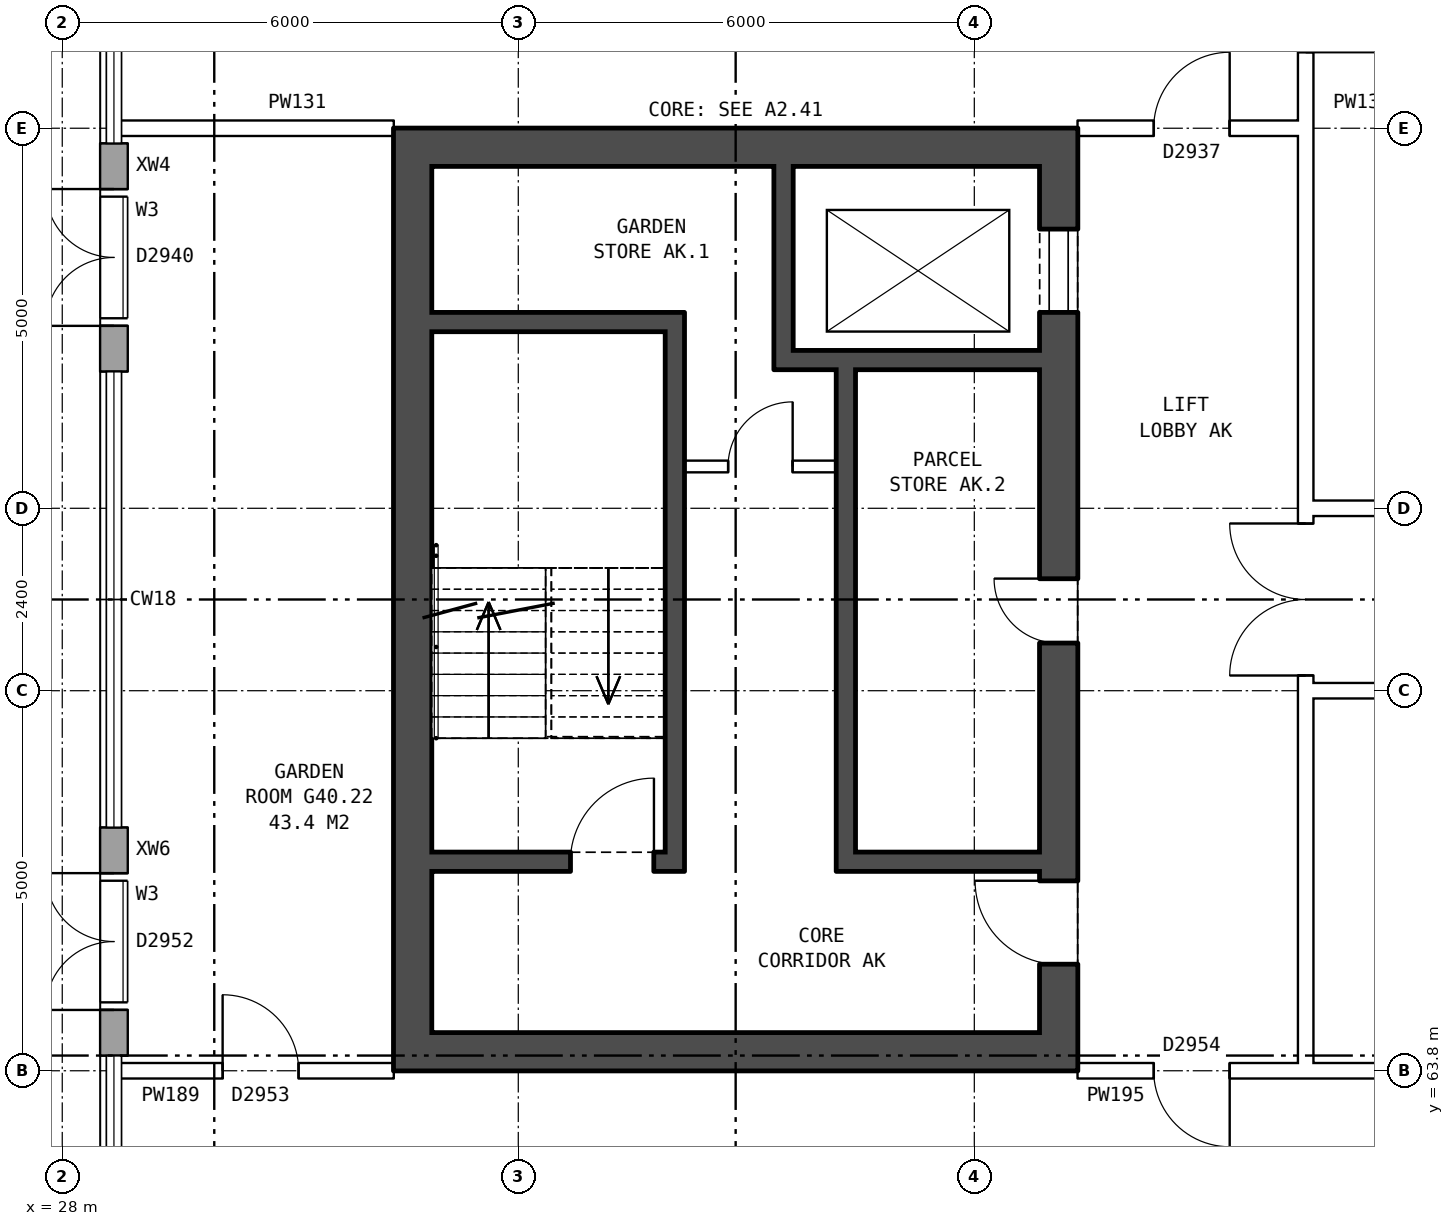
"""IFC4 building model, lengths in metres.
Left out: names, types, materials, properties, quantities, classifications, styles, units other than length and angle.
Written with IfcOpenShell. Run it as: python <this file> out.ifc"""

import sys

from ifc_helpers import new_model, si_unit, direction, frame, frame_2d, origin, place, context, subcontext, project, spatial, rectangle, extrude, element, fill, save


model = new_model("IFC4")
c1 = context("Model", 3, precision=1e-05, world=origin(), true_north=direction((0.0, 1.0)))
c2 = subcontext(c1, "Body", "Model", "MODEL_VIEW")
j1 = project(units=[si_unit("LENGTHUNIT", "METRE"), si_unit("PLANEANGLEUNIT", "RADIAN")], contexts=[c1])
p1 = place(None, origin())
s1 = spatial("IfcSite", under=j1, at=p1, CompositionType="ELEMENT")
p2 = place(p1, origin())
s2 = spatial("IfcBuilding", under=s1, at=p2, CompositionType="ELEMENT")
p3 = place(p2, frame((0.0, 0.0, 142.3)))
s3 = spatial("IfcBuildingStorey", under=s2, at=p3, CompositionType="ELEMENT", Elevation=142.3)
p4 = place(p3, frame((28.68, 76.0, 0.0), z_axis=(0.0, 0.0, 1.0), x_axis=(0.0, -1.0, 0.0)))
e1 = element("IfcWall", 1, at=p4, inside=s3, PredefinedType="STANDARD", context=c2, shape_type="SweptSolid", body=[
    extrude(rectangle(XDim=3.0, YDim=0.36, at=frame_2d((1.5, 0.0))), origin(), (0.0, 0.0, 1.0), 5.6),
])
p5 = place(p4, frame((0.7, 0.0, 3.4)))
e2 = element("IfcOpeningElement", 2, at=p5, cuts=e1, PredefinedType="OPENING", context=c2, shape_type="SweptSolid", body=[
    extrude(rectangle(XDim=1.6, YDim=1.2, at=frame_2d((0.8, 0.6))), frame((0.0, 0.19, 0.0), z_axis=(0.0, -1.0, 0.0), x_axis=(1.0, 0.0, 0.0)), (0.0, 0.0, 1.0), 0.38),
])
p6 = place(p4, frame((0.6, 0.0, 0.0)))
e3 = element("IfcOpeningElement", 3, at=p6, cuts=e1, PredefinedType="OPENING", context=c2, shape_type="SweptSolid", body=[
    extrude(rectangle(XDim=1.8, YDim=2.4, at=frame_2d((0.9, 1.2))), frame((0.0, 0.19, 0.0), z_axis=(0.0, -1.0, 0.0), x_axis=(1.0, 0.0, 0.0)), (0.0, 0.0, 1.0), 0.38),
])
p7 = place(p3, frame((28.68, 67.0, 0.0), z_axis=(0.0, 0.0, 1.0), x_axis=(0.0, -1.0, 0.0)))
e4 = element("IfcWall", 4, at=p7, inside=s3, PredefinedType="STANDARD", context=c2, shape_type="SweptSolid", body=[
    extrude(rectangle(XDim=3.0, YDim=0.36, at=frame_2d((1.5, 0.0))), origin(), (0.0, 0.0, 1.0), 5.6),
])
p8 = place(p7, frame((0.7, 0.0, 3.4)))
e5 = element("IfcOpeningElement", 5, at=p8, cuts=e4, PredefinedType="OPENING", context=c2, shape_type="SweptSolid", body=[
    extrude(rectangle(XDim=1.6, YDim=1.2, at=frame_2d((0.8, 0.6))), frame((0.0, 0.19, 0.0), z_axis=(0.0, -1.0, 0.0), x_axis=(1.0, 0.0, 0.0)), (0.0, 0.0, 1.0), 0.38),
])
p9 = place(p7, frame((0.6, 0.0, 0.0)))
e6 = element("IfcOpeningElement", 6, at=p9, cuts=e4, PredefinedType="OPENING", context=c2, shape_type="SweptSolid", body=[
    extrude(rectangle(XDim=1.8, YDim=2.4, at=frame_2d((0.9, 1.2))), frame((0.0, 0.19, 0.0), z_axis=(0.0, -1.0, 0.0), x_axis=(1.0, 0.0, 0.0)), (0.0, 0.0, 1.0), 0.38),
])
p10 = place(p3, frame((41.11, 76.2, 0.0), z_axis=(0.0, 0.0, 1.0), x_axis=(0.0, -1.0, 0.0)))
e7 = element("IfcWall", 7, at=p10, inside=s3, PredefinedType="SHEAR", context=c2, shape_type="SweptSolid", body=[
    extrude(rectangle(XDim=12.4, YDim=0.5, at=frame_2d((6.2, 0.0))), origin(), (0.0, 0.0, 1.0), 5.6),
])
p11 = place(p10, frame((1.325, 0.0, 0.0)))
e8 = element("IfcOpeningElement", 8, at=p11, cuts=e7, PredefinedType="OPENING", context=c2, shape_type="SweptSolid", body=[
    extrude(rectangle(XDim=1.1, YDim=2.1, at=frame_2d((0.55, 1.05))), frame((0.0, 0.26, 0.0), z_axis=(0.0, -1.0, 0.0), x_axis=(1.0, 0.0, 0.0)), (0.0, 0.0, 1.0), 0.52),
])
p12 = place(p10, frame((5.925, 0.0, 0.0)))
e9 = element("IfcOpeningElement", 9, at=p12, cuts=e7, PredefinedType="OPENING", context=c2, shape_type="SweptSolid", body=[
    extrude(rectangle(XDim=0.85, YDim=2.1, at=frame_2d((0.425, 1.05))), frame((0.0, 0.26, 0.0), z_axis=(0.0, -1.0, 0.0), x_axis=(1.0, 0.0, 0.0)), (0.0, 0.0, 1.0), 0.52),
])
p13 = place(p10, frame((9.9, 0.0, 0.0)))
e10 = element("IfcOpeningElement", 10, at=p13, cuts=e7, PredefinedType="OPENING", context=c2, shape_type="SweptSolid", body=[
    extrude(rectangle(XDim=1.1, YDim=2.1, at=frame_2d((0.55, 1.05))), frame((0.0, 0.26, 0.0), z_axis=(0.0, -1.0, 0.0), x_axis=(1.0, 0.0, 0.0)), (0.0, 0.0, 1.0), 0.52),
])
p14 = place(p3, frame((32.61, 76.2, 0.0), z_axis=(0.0, 0.0, 1.0), x_axis=(0.0, -1.0, 0.0)))
e11 = element("IfcWall", 11, at=p14, inside=s3, PredefinedType="SHEAR", context=c2, shape_type="SweptSolid", body=[
    extrude(rectangle(XDim=12.4, YDim=0.5, at=frame_2d((6.2, 0.0))), origin(), (0.0, 0.0, 1.0), 5.6),
])
for number, where, z_axis, x_axis in (
    (12, (40.86, 75.95, 0.0), (0.0, 0.0, 1.0), (-1.0, 0.0, 0.0)),
    (13, (40.86, 64.05, 0.0), (0.0, 0.0, 1.0), (-1.0, 0.0, 0.0)),
):
    element("IfcWall", number, at=place(p3, frame(where, z_axis=z_axis, x_axis=x_axis)), inside=s3, PredefinedType="SHEAR", context=c2, shape_type="SweptSolid", body=[
        extrude(rectangle(XDim=8.0, YDim=0.5, at=frame_2d((4.0, 0.0))), origin(), (0.0, 0.0, 1.0), 5.6),
    ])
p15 = place(p3, frame((35.935, 73.65, 0.0), z_axis=(0.0, 0.0, 1.0), x_axis=(-1.0, 0.0, 0.0)))
e14 = element("IfcWall", 14, at=p15, inside=s3, PredefinedType="SHEAR", context=c2, shape_type="SweptSolid", body=[
    extrude(rectangle(XDim=3.075, YDim=0.25, at=frame_2d((1.538, 0.0))), origin(), (0.0, 0.0, 1.0), 5.6),
])
p16 = place(p3, frame((40.86, 73.15, 0.0), z_axis=(0.0, 0.0, 1.0), x_axis=(-1.0, 0.0, 0.0)))
e15 = element("IfcWall", 15, at=p16, inside=s3, PredefinedType="SHEAR", context=c2, shape_type="SweptSolid", body=[
    extrude(rectangle(XDim=3.495, YDim=0.25, at=frame_2d((1.748, 0.0))), origin(), (0.0, 0.0, 1.0), 5.6),
])
p17 = place(p3, frame((38.185, 71.75, 0.0), z_axis=(0.0, 0.0, 1.0), x_axis=(-1.0, 0.0, 0.0)))
e16 = element("IfcWall", 16, at=p17, inside=s3, PredefinedType="PARTITIONING", context=c2, shape_type="SweptSolid", body=[
    extrude(rectangle(XDim=2.0, YDim=0.15, at=frame_2d((1.0, 0.0))), origin(), (0.0, 0.0, 1.0), 5.6),
])
p18 = place(p17, frame((0.575, 0.0, 0.0)))
e17 = element("IfcOpeningElement", 17, at=p18, cuts=e16, PredefinedType="OPENING", context=c2, shape_type="SweptSolid", body=[
    extrude(rectangle(XDim=0.85, YDim=2.1, at=frame_2d((0.425, 1.05))), frame((0.0, 0.085, 0.0), z_axis=(0.0, -1.0, 0.0), x_axis=(1.0, 0.0, 0.0)), (0.0, 0.0, 1.0), 0.17),
])
p19 = place(p3, frame((40.86, 66.55, 0.0), z_axis=(0.0, 0.0, 1.0), x_axis=(-1.0, 0.0, 0.0)))
e18 = element("IfcWall", 18, at=p19, inside=s3, PredefinedType="SHEAR", context=c2, shape_type="SweptSolid", body=[
    extrude(rectangle(XDim=2.425, YDim=0.25, at=frame_2d((1.212, 0.0))), origin(), (0.0, 0.0, 1.0), 5.6),
])
p20 = place(p3, frame((35.935, 66.55, 0.0), z_axis=(0.0, 0.0, 1.0), x_axis=(-1.0, 0.0, 0.0)))
e19 = element("IfcWall", 19, at=p20, inside=s3, PredefinedType="SHEAR", context=c2, shape_type="SweptSolid", body=[
    extrude(rectangle(XDim=3.075, YDim=0.25, at=frame_2d((1.538, 0.0))), origin(), (0.0, 0.0, 1.0), 5.6),
])
p21 = place(p20, frame((0.15, 0.0, 0.0)))
e20 = element("IfcOpeningElement", 20, at=p21, cuts=e19, PredefinedType="OPENING", context=c2, shape_type="SweptSolid", body=[
    extrude(rectangle(XDim=1.1, YDim=2.1, at=frame_2d((0.55, 1.05))), frame((0.0, 0.135, 0.0), z_axis=(0.0, -1.0, 0.0), x_axis=(1.0, 0.0, 0.0)), (0.0, 0.0, 1.0), 0.27),
])
p22 = place(p3, frame((38.31, 73.025, 0.0), z_axis=(0.0, 0.0, 1.0), x_axis=(0.0, -1.0, 0.0)))
e21 = element("IfcWall", 21, at=p22, inside=s3, PredefinedType="SHEAR", context=c2, shape_type="SweptSolid", body=[
    extrude(rectangle(XDim=6.6, YDim=0.25, at=frame_2d((3.3, 0.0))), origin(), (0.0, 0.0, 1.0), 5.6),
])
p23 = place(p3, frame((37.49, 75.7, 0.0), z_axis=(0.0, 0.0, 1.0), x_axis=(0.0, -1.0, 0.0)))
e22 = element("IfcWall", 22, at=p23, inside=s3, PredefinedType="SHEAR", context=c2, shape_type="SweptSolid", body=[
    extrude(rectangle(XDim=2.425, YDim=0.25, at=frame_2d((1.212, 0.0))), origin(), (0.0, 0.0, 1.0), 5.6),
])
p24 = place(p3, frame((36.06, 73.775, 0.0), z_axis=(0.0, 0.0, 1.0), x_axis=(0.0, -1.0, 0.0)))
e23 = element("IfcWall", 23, at=p24, inside=s3, PredefinedType="SHEAR", context=c2, shape_type="SweptSolid", body=[
    extrude(rectangle(XDim=7.35, YDim=0.25, at=frame_2d((3.675, 0.0))), origin(), (0.0, 0.0, 1.0), 5.6),
])
p25 = place(p3, frame((44.36, 63.9, 0.0), z_axis=(0.0, 0.0, 1.0), x_axis=(0.0, 1.0, 0.0)))
e24 = element("IfcWall", 24, at=p25, inside=s3, PredefinedType="PARTITIONING", context=c2, shape_type="SweptSolid", body=[
    extrude(rectangle(XDim=12.2, YDim=0.2, at=frame_2d((6.1, 0.0))), origin(), (0.0, 0.0, 1.0), 5.6),
])
p26 = place(p25, frame((5.1, 0.0, 0.0)))
e25 = element("IfcOpeningElement", 25, at=p26, cuts=e24, PredefinedType="OPENING", context=c2, shape_type="SweptSolid", body=[
    extrude(rectangle(XDim=2.0, YDim=2.1, at=frame_2d((1.0, 1.05))), frame((0.0, 0.11, 0.0), z_axis=(0.0, -1.0, 0.0), x_axis=(1.0, 0.0, 0.0)), (0.0, 0.0, 1.0), 0.22),
])
p27 = place(p3, frame((28.74, 63.8, 0.0), z_axis=(0.0, 0.0, 1.0), x_axis=(1.0, 0.0, 0.0)))
e26 = element("IfcWall", 26, at=p27, inside=s3, PredefinedType="PARTITIONING", context=c2, shape_type="SweptSolid", body=[
    extrude(rectangle(XDim=3.62, YDim=0.2, at=frame_2d((1.81, 0.0))), origin(), (0.0, 0.0, 1.0), 5.6),
])
p28 = place(p27, frame((1.37, 0.0, 0.0)))
e27 = element("IfcOpeningElement", 27, at=p28, cuts=e26, PredefinedType="OPENING", context=c2, shape_type="SweptSolid", body=[
    extrude(rectangle(XDim=1.0, YDim=2.1, at=frame_2d((0.5, 1.05))), frame((0.0, 0.11, 0.0), z_axis=(0.0, -1.0, 0.0), x_axis=(1.0, 0.0, 0.0)), (0.0, 0.0, 1.0), 0.22),
])
p29 = place(p3, frame((44.36, 63.8, 0.0), z_axis=(0.0, 0.0, 1.0), x_axis=(1.0, 0.0, 0.0)))
e28 = element("IfcWall", 28, at=p29, inside=s3, PredefinedType="PARTITIONING", context=c2, shape_type="SweptSolid", body=[
    extrude(rectangle(XDim=3.74, YDim=0.2, at=frame_2d((1.87, 0.0))), origin(), (0.0, 0.0, 1.0), 5.6),
])
p30 = place(p3, frame((41.36, 63.8, 0.0), z_axis=(0.0, 0.0, 1.0), x_axis=(1.0, 0.0, 0.0)))
e29 = element("IfcWall", 29, at=p30, inside=s3, PredefinedType="PARTITIONING", context=c2, shape_type="SweptSolid", body=[
    extrude(rectangle(XDim=3.0, YDim=0.2, at=frame_2d((1.5, 0.0))), origin(), (0.0, 0.0, 1.0), 5.6),
])
p31 = place(p30, frame((1.0, 0.0, 0.0)))
e30 = element("IfcOpeningElement", 30, at=p31, cuts=e29, PredefinedType="OPENING", context=c2, shape_type="SweptSolid", body=[
    extrude(rectangle(XDim=1.0, YDim=2.1, at=frame_2d((0.5, 1.05))), frame((0.0, 0.11, 0.0), z_axis=(0.0, -1.0, 0.0), x_axis=(1.0, 0.0, 0.0)), (0.0, 0.0, 1.0), 0.22),
])
p32 = place(p3, frame((44.36, 68.8, 0.0), z_axis=(0.0, 0.0, 1.0), x_axis=(1.0, 0.0, 0.0)))
e31 = element("IfcWall", 31, at=p32, inside=s3, PredefinedType="PARTITIONING", context=c2, shape_type="SweptSolid", body=[
    extrude(rectangle(XDim=19.28, YDim=0.2, at=frame_2d((9.64, 0.0))), origin(), (0.0, 0.0, 1.0), 5.6),
])
p33 = place(p32, frame((6.32, 0.0, 0.0)))
e32 = element("IfcOpeningElement", 32, at=p33, cuts=e31, PredefinedType="OPENING", context=c2, shape_type="SweptSolid", body=[
    extrude(rectangle(XDim=1.0, YDim=2.1, at=frame_2d((0.5, 1.05))), frame((0.0, 0.11, 0.0), z_axis=(0.0, -1.0, 0.0), x_axis=(1.0, 0.0, 0.0)), (0.0, 0.0, 1.0), 0.22),
])
p34 = place(p3, frame((44.36, 71.2, 0.0), z_axis=(0.0, 0.0, 1.0), x_axis=(1.0, 0.0, 0.0)))
e33 = element("IfcWall", 33, at=p34, inside=s3, PredefinedType="PARTITIONING", context=c2, shape_type="SweptSolid", body=[
    extrude(rectangle(XDim=19.28, YDim=0.2, at=frame_2d((9.64, 0.0))), origin(), (0.0, 0.0, 1.0), 5.6),
])
p35 = place(p34, frame((8.64, 0.0, 0.0)))
e34 = element("IfcOpeningElement", 34, at=p35, cuts=e33, PredefinedType="OPENING", context=c2, shape_type="SweptSolid", body=[
    extrude(rectangle(XDim=1.0, YDim=2.1, at=frame_2d((0.5, 1.05))), frame((0.0, 0.11, 0.0), z_axis=(0.0, -1.0, 0.0), x_axis=(1.0, 0.0, 0.0)), (0.0, 0.0, 1.0), 0.22),
])
p36 = place(p3, frame((28.74, 76.2, 0.0), z_axis=(0.0, 0.0, 1.0), x_axis=(1.0, 0.0, 0.0)))
e35 = element("IfcWall", 35, at=p36, inside=s3, PredefinedType="PARTITIONING", context=c2, shape_type="SweptSolid", body=[
    extrude(rectangle(XDim=3.62, YDim=0.2, at=frame_2d((1.81, 0.0))), origin(), (0.0, 0.0, 1.0), 5.6),
])
p37 = place(p3, frame((41.36, 76.2, 0.0), z_axis=(0.0, 0.0, 1.0), x_axis=(1.0, 0.0, 0.0)))
e36 = element("IfcWall", 36, at=p37, inside=s3, PredefinedType="PARTITIONING", context=c2, shape_type="SweptSolid", body=[
    extrude(rectangle(XDim=3.1, YDim=0.2, at=frame_2d((1.55, 0.0))), origin(), (0.0, 0.0, 1.0), 5.6),
])
p38 = place(p37, frame((1.0, 0.0, 0.0)))
e37 = element("IfcOpeningElement", 37, at=p38, cuts=e36, PredefinedType="OPENING", context=c2, shape_type="SweptSolid", body=[
    extrude(rectangle(XDim=1.0, YDim=2.1, at=frame_2d((0.5, 1.05))), frame((0.0, 0.11, 0.0), z_axis=(0.0, -1.0, 0.0), x_axis=(1.0, 0.0, 0.0)), (0.0, 0.0, 1.0), 0.22),
])
p39 = place(p3, frame((44.36, 76.1, 0.0), z_axis=(0.0, 0.0, 1.0), x_axis=(0.0, 1.0, 0.0)))
e38 = element("IfcWall", 38, at=p39, inside=s3, PredefinedType="PARTITIONING", context=c2, shape_type="SweptSolid", body=[
    extrude(rectangle(XDim=3.2, YDim=0.2, at=frame_2d((1.6, 0.0))), origin(), (0.0, 0.0, 1.0), 5.6),
])
p40 = place(p39, frame((1.1, 0.0, 0.0)))
e39 = element("IfcOpeningElement", 39, at=p40, cuts=e38, PredefinedType="OPENING", context=c2, shape_type="SweptSolid", body=[
    extrude(rectangle(XDim=1.0, YDim=2.1, at=frame_2d((0.5, 1.05))), frame((0.0, 0.11, 0.0), z_axis=(0.0, -1.0, 0.0), x_axis=(1.0, 0.0, 0.0)), (0.0, 0.0, 1.0), 0.22),
])
p41 = place(p5, origin())
e40 = element("IfcWindow", 40, at=p41, inside=s3, PartitioningType="DOUBLE_PANEL_HORIZONTAL", PredefinedType="WINDOW", context=c2, shape_type="SweptSolid", body=[
    extrude(rectangle(XDim=1.6, YDim=1.2, at=frame_2d((0.8, 0.6))), frame((0.0, 0.15, 0.0), z_axis=(0.0, -1.0, 0.0), x_axis=(1.0, 0.0, 0.0)), (0.0, 0.0, 1.0), 0.06),
])
fill(e2, e40)
p42 = place(p6, frame((1.8, 0.0, 0.0), z_axis=(0.0, 0.0, 1.0), x_axis=(-1.0, 0.0, 0.0)))
e41 = element("IfcDoor", 41, at=p42, inside=s3, OperationType="DOUBLE_DOOR_SINGLE_SWING", PredefinedType="DOOR", context=c2, shape_type="SweptSolid", body=[
    extrude(rectangle(XDim=1.8, YDim=2.4, at=frame_2d((0.9, 1.2))), frame((0.0, 0.025, 0.0), z_axis=(0.0, -1.0, 0.0), x_axis=(1.0, 0.0, 0.0)), (0.0, 0.0, 1.0), 0.05),
])
fill(e3, e41)
p43 = place(p8, origin())
e42 = element("IfcWindow", 42, at=p43, inside=s3, PartitioningType="DOUBLE_PANEL_HORIZONTAL", PredefinedType="WINDOW", context=c2, shape_type="SweptSolid", body=[
    extrude(rectangle(XDim=1.6, YDim=1.2, at=frame_2d((0.8, 0.6))), frame((0.0, 0.15, 0.0), z_axis=(0.0, -1.0, 0.0), x_axis=(1.0, 0.0, 0.0)), (0.0, 0.0, 1.0), 0.06),
])
fill(e5, e42)
p44 = place(p9, frame((1.8, 0.0, 0.0), z_axis=(0.0, 0.0, 1.0), x_axis=(-1.0, 0.0, 0.0)))
e43 = element("IfcDoor", 43, at=p44, inside=s3, OperationType="DOUBLE_DOOR_SINGLE_SWING", PredefinedType="DOOR", context=c2, shape_type="SweptSolid", body=[
    extrude(rectangle(XDim=1.8, YDim=2.4, at=frame_2d((0.9, 1.2))), frame((0.0, 0.025, 0.0), z_axis=(0.0, -1.0, 0.0), x_axis=(1.0, 0.0, 0.0)), (0.0, 0.0, 1.0), 0.05),
])
fill(e6, e43)
p45 = place(p11, origin())
e44 = element("IfcDoor", 44, at=p45, inside=s3, OperationType="DOUBLE_DOOR_SLIDING", PredefinedType="DOOR", context=c2, shape_type="SweptSolid", body=[
    extrude(rectangle(XDim=1.1, YDim=2.1, at=frame_2d((0.55, 1.05))), frame((0.0, -0.185, 0.0), z_axis=(0.0, -1.0, 0.0), x_axis=(1.0, 0.0, 0.0)), (0.0, 0.0, 1.0), 0.05),
])
fill(e8, e44)
p46 = place(p12, frame((0.85, 0.0, 0.0), z_axis=(0.0, 0.0, 1.0), x_axis=(-1.0, 0.0, 0.0)))
e45 = element("IfcDoor", 45, at=p46, inside=s3, OperationType="SINGLE_SWING_RIGHT", PredefinedType="DOOR", context=c2, shape_type="SweptSolid", body=[
    extrude(rectangle(XDim=0.85, YDim=2.1, at=frame_2d((0.425, 1.05))), frame((0.0, 0.235, 0.0), z_axis=(0.0, -1.0, 0.0), x_axis=(1.0, 0.0, 0.0)), (0.0, 0.0, 1.0), 0.05),
])
fill(e9, e45)
p47 = place(p13, frame((1.1, 0.0, 0.0), z_axis=(0.0, 0.0, 1.0), x_axis=(-1.0, 0.0, 0.0)))
e46 = element("IfcDoor", 46, at=p47, inside=s3, OperationType="SINGLE_SWING_RIGHT", PredefinedType="DOOR", context=c2, shape_type="SweptSolid", body=[
    extrude(rectangle(XDim=1.1, YDim=2.1, at=frame_2d((0.55, 1.05))), frame((0.0, 0.235, 0.0), z_axis=(0.0, -1.0, 0.0), x_axis=(1.0, 0.0, 0.0)), (0.0, 0.0, 1.0), 0.05),
])
fill(e10, e46)
p48 = place(p21, frame((1.1, 0.0, 0.0), z_axis=(0.0, 0.0, 1.0), x_axis=(-1.0, 0.0, 0.0)))
e47 = element("IfcDoor", 47, at=p48, inside=s3, OperationType="SINGLE_SWING_RIGHT", PredefinedType="DOOR", context=c2, shape_type="SweptSolid", body=[
    extrude(rectangle(XDim=1.1, YDim=2.1, at=frame_2d((0.55, 1.05))), frame((0.0, 0.025, 0.0), z_axis=(0.0, -1.0, 0.0), x_axis=(1.0, 0.0, 0.0)), (0.0, 0.0, 1.0), 0.05),
])
fill(e20, e47)
p49 = place(p18, frame((0.85, 0.0, 0.0), z_axis=(0.0, 0.0, 1.0), x_axis=(-1.0, 0.0, 0.0)))
e48 = element("IfcDoor", 48, at=p49, inside=s3, OperationType="SINGLE_SWING_RIGHT", PredefinedType="DOOR", context=c2, shape_type="SweptSolid", body=[
    extrude(rectangle(XDim=0.85, YDim=2.1, at=frame_2d((0.425, 1.05))), frame((0.0, 0.025, 0.0), z_axis=(0.0, -1.0, 0.0), x_axis=(1.0, 0.0, 0.0)), (0.0, 0.0, 1.0), 0.05),
])
fill(e17, e48)
p50 = place(p26, origin())
e49 = element("IfcDoor", 49, at=p50, inside=s3, OperationType="DOUBLE_DOOR_SINGLE_SWING", PredefinedType="DOOR", context=c2, shape_type="SweptSolid", body=[
    extrude(rectangle(XDim=2.0, YDim=2.1, at=frame_2d((1.0, 1.05))), frame((0.0, 0.025, 0.0), z_axis=(0.0, -1.0, 0.0), x_axis=(1.0, 0.0, 0.0)), (0.0, 0.0, 1.0), 0.05),
])
fill(e25, e49)
p51 = place(p28, origin())
e50 = element("IfcDoor", 50, at=p51, inside=s3, OperationType="SINGLE_SWING_LEFT", PredefinedType="DOOR", context=c2, shape_type="SweptSolid", body=[
    extrude(rectangle(XDim=1.0, YDim=2.1, at=frame_2d((0.5, 1.05))), frame((0.0, 0.025, 0.0), z_axis=(0.0, -1.0, 0.0), x_axis=(1.0, 0.0, 0.0)), (0.0, 0.0, 1.0), 0.05),
])
fill(e27, e50)
p52 = place(p31, frame((1.0, 0.0, 0.0), z_axis=(0.0, 0.0, 1.0), x_axis=(-1.0, 0.0, 0.0)))
e51 = element("IfcDoor", 51, at=p52, inside=s3, OperationType="SINGLE_SWING_LEFT", PredefinedType="DOOR", context=c2, shape_type="SweptSolid", body=[
    extrude(rectangle(XDim=1.0, YDim=2.1, at=frame_2d((0.5, 1.05))), frame((0.0, 0.025, 0.0), z_axis=(0.0, -1.0, 0.0), x_axis=(1.0, 0.0, 0.0)), (0.0, 0.0, 1.0), 0.05),
])
fill(e30, e51)
p53 = place(p38, origin())
e52 = element("IfcDoor", 52, at=p53, inside=s3, OperationType="SINGLE_SWING_RIGHT", PredefinedType="DOOR", context=c2, shape_type="SweptSolid", body=[
    extrude(rectangle(XDim=1.0, YDim=2.1, at=frame_2d((0.5, 1.05))), frame((0.0, 0.025, 0.0), z_axis=(0.0, -1.0, 0.0), x_axis=(1.0, 0.0, 0.0)), (0.0, 0.0, 1.0), 0.05),
])
fill(e37, e52)
save(model, sys.argv[1])
